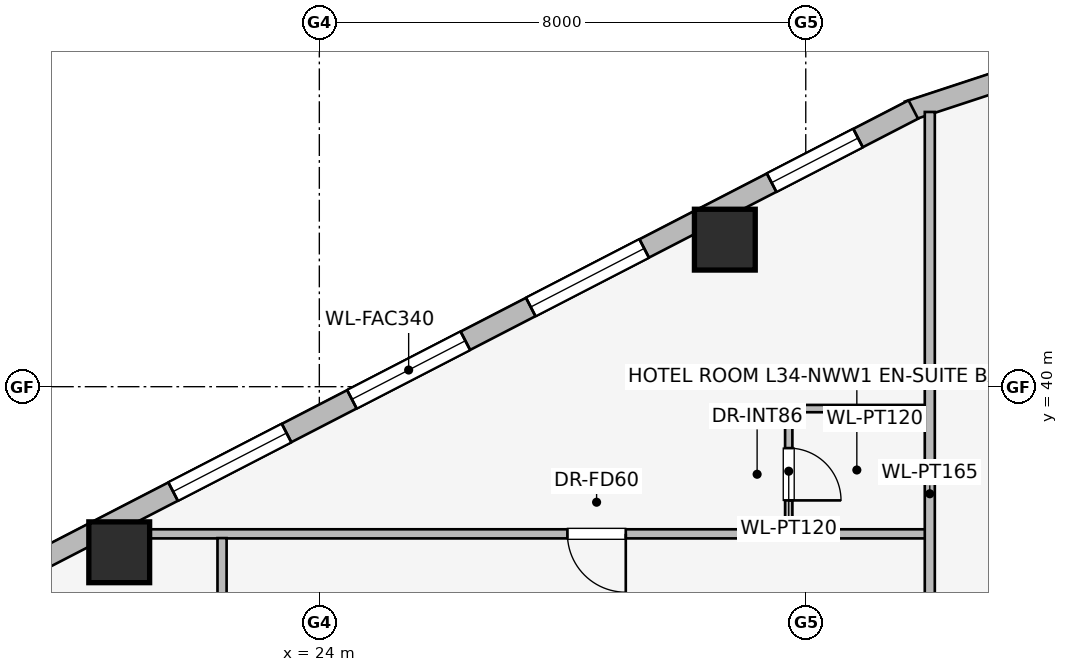
"""IFC4 building model, lengths in metres.
Left out: names, types, materials, properties, quantities, classifications, styles, units other than length and angle.
Written with IfcOpenShell. Run it as: python <this file> out.ifc"""

import sys

from ifc_helpers import new_model, si_unit, direction, frame, frame_2d, origin, origin_2d, place, context, subcontext, project, spatial, rectangle, extrude, element, fill, save


model = new_model("IFC4")
c1 = context("Model", 3, precision=1e-05, world=origin(), true_north=direction((0.0, 1.0)))
c2 = subcontext(c1, "Body", "Model", "MODEL_VIEW")
j1 = project(units=[si_unit("LENGTHUNIT", "METRE"), si_unit("PLANEANGLEUNIT", "RADIAN")], contexts=[c1])
p1 = place(None, origin())
s1 = spatial("IfcSite", under=j1, at=p1, CompositionType="ELEMENT")
p2 = place(p1, origin())
s2 = spatial("IfcBuilding", under=s1, at=p2, CompositionType="ELEMENT")
p3 = place(p2, frame((0.0, 0.0, 129.15)))
s3 = spatial("IfcBuildingStorey", under=s2, at=p3, CompositionType="ELEMENT", Elevation=129.15)
for number, where, z_axis, x_axis in (
    (1, (30.669, 42.418, 0.0), (0.0, 0.0, 1.0), (1.0, 0.0, 0.0)),
    (2, (20.709, 37.277, 0.0), (0.0, 0.0, 1.0), (1.0, 0.0, 0.0)),
):
    element("IfcColumn", number, at=place(p3, frame(where, z_axis=z_axis, x_axis=x_axis)), inside=s3, PredefinedType="COLUMN", context=c2, shape_type="SweptSolid", body=[
        extrude(rectangle(XDim=1.0, YDim=1.0, at=origin_2d()), origin(), (0.0, 0.0, 1.0), 3.45),
    ])
p4 = place(p3, frame((33.681, 44.532, 0.0), z_axis=(0.0, 0.0, 1.0), x_axis=(0.949937416267, 0.312440242569, 0.0)))
e3 = element("IfcWall", 3, at=p4, inside=s3, PredefinedType="STANDARD", context=c2, shape_type="SweptSolid", body=[
    extrude(rectangle(XDim=1.722, YDim=0.33, at=frame_2d((0.861, 0.0))), origin(), (0.0, 0.0, 1.0), 3.19),
])
p5 = place(p3, frame((17.169, 35.99, 0.0), z_axis=(0.0, 0.0, 1.0), x_axis=(0.888613612362, 0.458656568606, 0.0)))
e4 = element("IfcWall", 4, at=p5, inside=s3, PredefinedType="STANDARD", context=c2, shape_type="SweptSolid", body=[
    extrude(rectangle(XDim=18.681, YDim=0.34, at=frame_2d((9.34, 0.0))), origin(), (0.0, 0.0, 1.0), 3.19),
])
p6 = place(p5, frame((1.023, 0.0, 0.75)))
e5 = element("IfcOpeningElement", 5, at=p6, cuts=e4, PredefinedType="OPENING", context=c2, shape_type="SweptSolid", body=[
    extrude(rectangle(XDim=1.6, YDim=1.55, at=frame_2d((0.8, 0.775))), frame((0.0, 0.18, 0.0), z_axis=(0.0, -1.0, 0.0), x_axis=(1.0, 0.0, 0.0)), (0.0, 0.0, 1.0), 0.36),
])
p7 = place(p5, frame((4.981, 0.0, 0.75)))
e6 = element("IfcOpeningElement", 6, at=p7, cuts=e4, PredefinedType="OPENING", context=c2, shape_type="SweptSolid", body=[
    extrude(rectangle(XDim=2.1, YDim=1.5, at=frame_2d((1.05, 0.75))), frame((0.0, 0.18, 0.0), z_axis=(0.0, -1.0, 0.0), x_axis=(1.0, 0.0, 0.0)), (0.0, 0.0, 1.0), 0.36),
])
p8 = place(p5, frame((8.29, 0.0, 0.75)))
e7 = element("IfcOpeningElement", 7, at=p8, cuts=e4, PredefinedType="OPENING", context=c2, shape_type="SweptSolid", body=[
    extrude(rectangle(XDim=2.1, YDim=1.5, at=frame_2d((1.05, 0.75))), frame((0.0, 0.18, 0.0), z_axis=(0.0, -1.0, 0.0), x_axis=(1.0, 0.0, 0.0)), (0.0, 0.0, 1.0), 0.36),
])
p9 = place(p5, frame((11.6, 0.0, 0.75)))
e8 = element("IfcOpeningElement", 8, at=p9, cuts=e4, PredefinedType="OPENING", context=c2, shape_type="SweptSolid", body=[
    extrude(rectangle(XDim=2.1, YDim=1.5, at=frame_2d((1.05, 0.75))), frame((0.0, 0.18, 0.0), z_axis=(0.0, -1.0, 0.0), x_axis=(1.0, 0.0, 0.0)), (0.0, 0.0, 1.0), 0.36),
])
p10 = place(p5, frame((16.058, 0.0, 0.75)))
e9 = element("IfcOpeningElement", 9, at=p10, cuts=e4, PredefinedType="OPENING", context=c2, shape_type="SweptSolid", body=[
    extrude(rectangle(XDim=1.6, YDim=1.55, at=frame_2d((0.8, 0.775))), frame((0.0, 0.18, 0.0), z_axis=(0.0, -1.0, 0.0), x_axis=(1.0, 0.0, 0.0)), (0.0, 0.0, 1.0), 0.36),
])
p11 = place(p3, frame((34.0, 39.64, 0.0), z_axis=(0.0, 0.0, 1.0), x_axis=(-1.0, 0.0, 0.0)))
e10 = element("IfcWall", 10, at=p11, inside=s3, PredefinedType="PARTITIONING", context=c2, shape_type="SweptSolid", body=[
    extrude(rectangle(XDim=2.34, YDim=0.12, at=frame_2d((1.17, 0.0))), origin(), (0.0, 0.0, 1.0), 3.19),
])
p12 = place(p3, frame((31.72, 39.64, 0.0), z_axis=(0.0, 0.0, 1.0), x_axis=(0.0, -1.0, 0.0)))
e11 = element("IfcWall", 11, at=p12, inside=s3, PredefinedType="PARTITIONING", context=c2, shape_type="SweptSolid", body=[
    extrude(rectangle(XDim=2.06, YDim=0.12, at=frame_2d((1.03, 0.0))), origin(), (0.0, 0.0, 1.0), 3.19),
])
p13 = place(p12, frame((0.65, 0.0, 0.0)))
e12 = element("IfcOpeningElement", 12, at=p13, cuts=e11, PredefinedType="OPENING", context=c2, shape_type="SweptSolid", body=[
    extrude(rectangle(XDim=0.86, YDim=2.0, at=frame_2d((0.43, 1.0))), frame((0.0, 0.07, 0.0), z_axis=(0.0, -1.0, 0.0), x_axis=(1.0, 0.0, 0.0)), (0.0, 0.0, 1.0), 0.14),
])
p14 = place(p3, frame((34.0, 37.58, 0.0), z_axis=(0.0, 0.0, 1.0), x_axis=(-1.0, 0.0, 0.0)))
e13 = element("IfcWall", 13, at=p14, inside=s3, PredefinedType="PARTITIONING", context=c2, shape_type="SweptSolid", body=[
    extrude(rectangle(XDim=13.707, YDim=0.15, at=frame_2d((6.854, 0.0))), origin(), (0.0, 0.0, 1.0), 2.582),
])
p15 = place(p14, frame((4.96, 0.0, 0.0)))
e14 = element("IfcOpeningElement", 14, at=p15, cuts=e13, PredefinedType="OPENING", context=c2, shape_type="SweptSolid", body=[
    extrude(rectangle(XDim=0.96, YDim=2.0, at=frame_2d((0.48, 1.0))), frame((0.0, 0.085, 0.0), z_axis=(0.0, -1.0, 0.0), x_axis=(1.0, 0.0, 0.0)), (0.0, 0.0, 1.0), 0.17),
])
p16 = place(p3, frame((34.04, 31.96, 0.0), z_axis=(0.0, 0.0, 1.0), x_axis=(0.0, 1.0, 0.0)))
e15 = element("IfcWall", 15, at=p16, inside=s3, PredefinedType="PARTITIONING", context=c2, shape_type="SweptSolid", body=[
    extrude(rectangle(XDim=12.558, YDim=0.165, at=frame_2d((6.279, 0.0))), origin(), (0.0, 0.0, 1.0), 3.19),
])
p17 = place(p3, frame((22.4, 36.08, 0.0), z_axis=(0.0, 0.0, 1.0), x_axis=(0.0, 1.0, 0.0)))
e16 = element("IfcWall", 16, at=p17, inside=s3, PredefinedType="PARTITIONING", context=c2, shape_type="SweptSolid", body=[
    extrude(rectangle(XDim=1.43, YDim=0.15, at=frame_2d((0.715, 0.0))), origin(), (0.0, 0.0, 1.0), 3.19),
])
p18 = place(p7, origin())
e17 = element("IfcWindow", 17, at=p18, inside=s3, PartitioningType="SINGLE_PANEL", PredefinedType="WINDOW", context=c2, shape_type="SweptSolid", body=[
    extrude(rectangle(XDim=2.1, YDim=1.5, at=frame_2d((1.05, 0.75))), frame((0.0, 0.03, 0.0), z_axis=(0.0, -1.0, 0.0), x_axis=(1.0, 0.0, 0.0)), (0.0, 0.0, 1.0), 0.06),
])
fill(e6, e17)
p19 = place(p8, origin())
e18 = element("IfcWindow", 18, at=p19, inside=s3, PartitioningType="SINGLE_PANEL", PredefinedType="WINDOW", context=c2, shape_type="SweptSolid", body=[
    extrude(rectangle(XDim=2.1, YDim=1.5, at=frame_2d((1.05, 0.75))), frame((0.0, 0.03, 0.0), z_axis=(0.0, -1.0, 0.0), x_axis=(1.0, 0.0, 0.0)), (0.0, 0.0, 1.0), 0.06),
])
fill(e7, e18)
p20 = place(p9, origin())
e19 = element("IfcWindow", 19, at=p20, inside=s3, PartitioningType="SINGLE_PANEL", PredefinedType="WINDOW", context=c2, shape_type="SweptSolid", body=[
    extrude(rectangle(XDim=2.1, YDim=1.5, at=frame_2d((1.05, 0.75))), frame((0.0, 0.03, 0.0), z_axis=(0.0, -1.0, 0.0), x_axis=(1.0, 0.0, 0.0)), (0.0, 0.0, 1.0), 0.06),
])
fill(e8, e19)
p21 = place(p10, origin())
e20 = element("IfcWindow", 20, at=p21, inside=s3, PartitioningType="SINGLE_PANEL", PredefinedType="WINDOW", context=c2, shape_type="SweptSolid", body=[
    extrude(rectangle(XDim=1.6, YDim=1.55, at=frame_2d((0.8, 0.775))), frame((0.0, 0.03, 0.0), z_axis=(0.0, -1.0, 0.0), x_axis=(1.0, 0.0, 0.0)), (0.0, 0.0, 1.0), 0.06),
])
fill(e9, e20)
p22 = place(p13, origin())
e21 = element("IfcDoor", 21, at=p22, inside=s3, OperationType="SINGLE_SWING_RIGHT", PredefinedType="DOOR", context=c2, shape_type="SweptSolid", body=[
    extrude(rectangle(XDim=0.86, YDim=2.0, at=frame_2d((0.43, 1.0))), frame((0.0, 0.025, 0.0), z_axis=(0.0, -1.0, 0.0), x_axis=(1.0, 0.0, 0.0)), (0.0, 0.0, 1.0), 0.05),
])
fill(e12, e21)
p23 = place(p15, origin())
e22 = element("IfcDoor", 22, at=p23, inside=s3, OperationType="SINGLE_SWING_LEFT", PredefinedType="DOOR", context=c2, shape_type="SweptSolid", body=[
    extrude(rectangle(XDim=0.96, YDim=2.0, at=frame_2d((0.48, 1.0))), frame((0.0, 0.025, 0.0), z_axis=(0.0, -1.0, 0.0), x_axis=(1.0, 0.0, 0.0)), (0.0, 0.0, 1.0), 0.05),
])
fill(e14, e22)
save(model, sys.argv[1])
